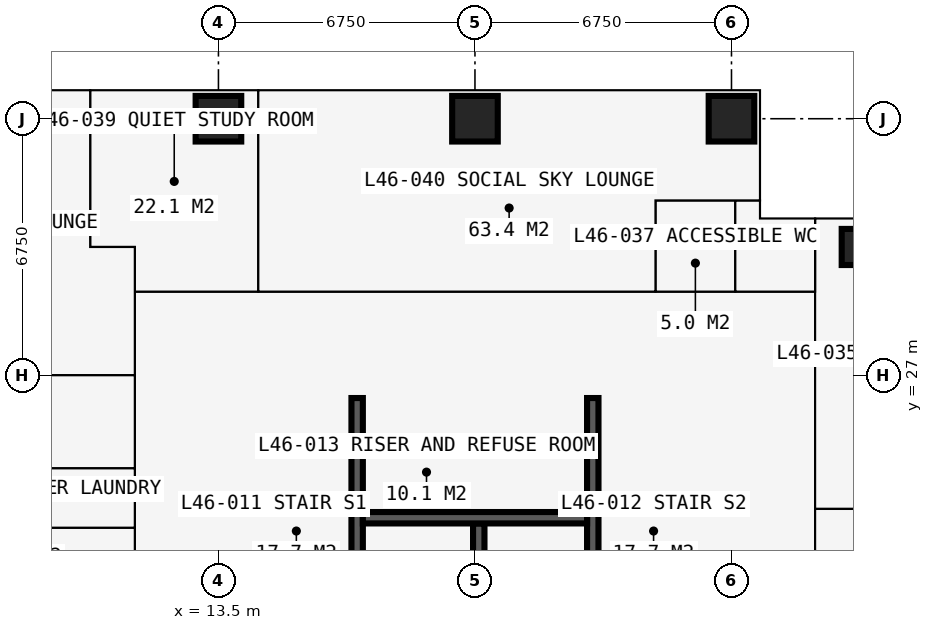
"""IFC4 building model, lengths in metres.
Left out: names, types, materials, properties, quantities, classifications, styles, units other than length and angle.
Written with IfcOpenShell. Run it as: python <this file> out.ifc"""

import sys

from ifc_helpers import new_model, si_unit, direction, frame, frame_2d, origin, origin_2d, place, context, subcontext, project, spatial, rectangle, extrude, element, fill, save


model = new_model("IFC4")
c1 = context("Model", 3, precision=1e-05, world=origin(), true_north=direction((0.0, 1.0)))
c2 = subcontext(c1, "Body", "Model", "MODEL_VIEW")
j1 = project(units=[si_unit("LENGTHUNIT", "METRE"), si_unit("PLANEANGLEUNIT", "RADIAN")], contexts=[c1])
p1 = place(None, origin())
s1 = spatial("IfcSite", under=j1, at=p1, CompositionType="ELEMENT")
p2 = place(p1, origin())
s2 = spatial("IfcBuilding", under=s1, at=p2, CompositionType="ELEMENT")
p3 = place(p2, frame((0.0, 0.0, 171.0)))
s3 = spatial("IfcBuildingStorey", under=s2, at=p3, CompositionType="ELEMENT", Elevation=171.0)
for number, where, z_axis, x_axis in (
    (1, (13.5, 33.75, 0.0), (0.0, 0.0, 1.0), (1.0, 0.0, 0.0)),
    (2, (20.25, 33.75, 0.0), (0.0, 0.0, 1.0), (1.0, 0.0, 0.0)),
    (3, (27.0, 33.75, 0.0), (0.0, 0.0, 1.0), (1.0, 0.0, 0.0)),
):
    element("IfcColumn", number, at=place(p3, frame(where, z_axis=z_axis, x_axis=x_axis)), inside=s3, PredefinedType="COLUMN", context=c2, shape_type="SweptSolid", body=[
        extrude(rectangle(XDim=1.2, YDim=1.2, at=origin_2d()), origin(), (0.0, 0.0, 1.0), 3.6),
    ])
p4 = place(p3, frame((30.375, 30.375, 0.0), z_axis=(0.0, 0.0, 1.0), x_axis=(1.0, 0.0, 0.0)))
e4 = element("IfcColumn", 4, at=p4, inside=s3, PredefinedType="COLUMN", context=c2, shape_type="SweptSolid", body=[
    extrude(rectangle(XDim=0.95, YDim=0.95, at=origin_2d()), origin(), (0.0, 0.0, 1.0), 3.6),
])
p5 = place(p3, frame((26.9, 14.1, 0.0), z_axis=(0.0, 0.0, 1.0), x_axis=(0.0, 1.0, 0.0)))
e5 = element("IfcWall", 5, at=p5, inside=s3, PredefinedType="SHEAR", context=c2, shape_type="SweptSolid", body=[
    extrude(rectangle(XDim=12.3, YDim=1.0, at=frame_2d((6.15, 0.0))), origin(), (0.0, 0.0, 1.0), 3.6),
])
p6 = place(p5, frame((3.65, 0.0, 0.0)))
e6 = element("IfcOpeningElement", 6, at=p6, cuts=e5, PredefinedType="OPENING", context=c2, shape_type="SweptSolid", body=[
    extrude(rectangle(XDim=1.2, YDim=2.2, at=frame_2d((0.6, 1.1))), frame((0.0, 0.51, 0.0), z_axis=(0.0, -1.0, 0.0), x_axis=(1.0, 0.0, 0.0)), (0.0, 0.0, 1.0), 1.02),
])
p7 = place(p3, frame((27.4, 27.0, 0.0), z_axis=(0.0, 0.0, 1.0), x_axis=(-1.0, 0.0, 0.0)))
e7 = element("IfcWall", 7, at=p7, inside=s3, PredefinedType="SHEAR", context=c2, shape_type="SweptSolid", body=[
    extrude(rectangle(XDim=14.3, YDim=1.2, at=frame_2d((7.15, 0.0))), origin(), (0.0, 0.0, 1.0), 3.6),
])
p8 = place(p7, frame((4.55, 0.0, 0.0)))
e8 = element("IfcOpeningElement", 8, at=p8, cuts=e7, PredefinedType="OPENING", context=c2, shape_type="SweptSolid", body=[
    extrude(rectangle(XDim=0.9, YDim=2.2, at=frame_2d((0.45, 1.1))), frame((0.0, 0.61, 0.0), z_axis=(0.0, -1.0, 0.0), x_axis=(1.0, 0.0, 0.0)), (0.0, 0.0, 1.0), 1.22),
])
p9 = place(p7, frame((7.525, 0.0, 0.0)))
e9 = element("IfcOpeningElement", 9, at=p9, cuts=e7, PredefinedType="OPENING", context=c2, shape_type="SweptSolid", body=[
    extrude(rectangle(XDim=1.0, YDim=2.2, at=frame_2d((0.5, 1.1))), frame((0.0, 0.61, 0.0), z_axis=(0.0, -1.0, 0.0), x_axis=(1.0, 0.0, 0.0)), (0.0, 0.0, 1.0), 1.22),
])
p10 = place(p3, frame((13.6, 26.4, 0.0), z_axis=(0.0, 0.0, 1.0), x_axis=(0.0, -1.0, 0.0)))
e10 = element("IfcWall", 10, at=p10, inside=s3, PredefinedType="SHEAR", context=c2, shape_type="SweptSolid", body=[
    extrude(rectangle(XDim=12.3, YDim=1.0, at=frame_2d((6.15, 0.0))), origin(), (0.0, 0.0, 1.0), 3.6),
])
p11 = place(p10, frame((7.45, 0.0, 0.0)))
e11 = element("IfcOpeningElement", 11, at=p11, cuts=e10, PredefinedType="OPENING", context=c2, shape_type="SweptSolid", body=[
    extrude(rectangle(XDim=1.2, YDim=2.2, at=frame_2d((0.6, 1.1))), frame((0.0, 0.51, 0.0), z_axis=(0.0, -1.0, 0.0), x_axis=(1.0, 0.0, 0.0)), (0.0, 0.0, 1.0), 1.02),
])
p12 = place(p3, frame((31.125, 31.125, 0.0), z_axis=(0.0, 0.0, 1.0), x_axis=(-1.0, 0.0, 0.0)))
e12 = element("IfcWall", 12, at=p12, inside=s3, PredefinedType="SOLIDWALL", context=c2, shape_type="SweptSolid", body=[
    extrude(rectangle(XDim=3.375, YDim=0.3, at=frame_2d((1.688, 0.0))), origin(), (0.0, 0.0, 1.0), 3.375),
])
p13 = place(p12, frame((0.212, 0.0, 0.9)))
e13 = element("IfcOpeningElement", 13, at=p13, cuts=e12, PredefinedType="OPENING", context=c2, shape_type="SweptSolid", body=[
    extrude(rectangle(XDim=1.5, YDim=1.8, at=frame_2d((0.75, 0.9))), frame((0.0, 0.16, 0.0), z_axis=(0.0, -1.0, 0.0), x_axis=(1.0, 0.0, 0.0)), (0.0, 0.0, 1.0), 0.32),
])
p14 = place(p3, frame((27.75, 31.125, 0.0), z_axis=(0.0, 0.0, 1.0), x_axis=(0.0, 1.0, 0.0)))
e14 = element("IfcWall", 14, at=p14, inside=s3, PredefinedType="SOLIDWALL", context=c2, shape_type="SweptSolid", body=[
    extrude(rectangle(XDim=3.375, YDim=0.3, at=frame_2d((1.688, 0.0))), origin(), (0.0, 0.0, 1.0), 3.375),
])
p15 = place(p14, frame((0.788, 0.0, 0.6)))
e15 = element("IfcOpeningElement", 15, at=p15, cuts=e14, PredefinedType="OPENING", context=c2, shape_type="SweptSolid", body=[
    extrude(rectangle(XDim=1.8, YDim=2.1, at=frame_2d((0.9, 1.05))), frame((0.0, 0.16, 0.0), z_axis=(0.0, -1.0, 0.0), x_axis=(1.0, 0.0, 0.0)), (0.0, 0.0, 1.0), 0.32),
])
p16 = place(p3, frame((13.5, 34.5, 0.0), z_axis=(0.0, 0.0, 1.0), x_axis=(1.0, 0.0, 0.0)))
e16 = element("IfcWall", 16, at=p16, inside=s3, PredefinedType="SOLIDWALL", context=c2, shape_type="SweptSolid", body=[
    extrude(rectangle(XDim=6.75, YDim=0.15, at=frame_2d((3.375, 0.0))), origin(), (0.0, 0.0, 1.0), 3.375),
])
p17 = place(p16, frame((0.363, 0.0, 0.0)))
e17 = element("IfcOpeningElement", 17, at=p17, cuts=e16, PredefinedType="OPENING", context=c2, shape_type="SweptSolid", body=[
    extrude(rectangle(XDim=1.0, YDim=2.2, at=frame_2d((0.5, 1.1))), frame((0.0, 0.085, 0.0), z_axis=(0.0, -1.0, 0.0), x_axis=(1.0, 0.0, 0.0)), (0.0, 0.0, 1.0), 0.17),
])
p18 = place(p16, frame((1.725, 0.0, 0.9)))
e18 = element("IfcOpeningElement", 18, at=p18, cuts=e16, PredefinedType="OPENING", context=c2, shape_type="SweptSolid", body=[
    extrude(rectangle(XDim=1.2, YDim=1.8, at=frame_2d((0.6, 0.9))), frame((0.0, 0.085, 0.0), z_axis=(0.0, -1.0, 0.0), x_axis=(1.0, 0.0, 0.0)), (0.0, 0.0, 1.0), 0.17),
])
p19 = place(p16, frame((5.137, 0.0, 0.0)))
e19 = element("IfcOpeningElement", 19, at=p19, cuts=e16, PredefinedType="OPENING", context=c2, shape_type="SweptSolid", body=[
    extrude(rectangle(XDim=1.0, YDim=2.2, at=frame_2d((0.5, 1.1))), frame((0.0, 0.085, 0.0), z_axis=(0.0, -1.0, 0.0), x_axis=(1.0, 0.0, 0.0)), (0.0, 0.0, 1.0), 0.17),
])
p20 = place(p16, frame((3.825, 0.0, 0.9)))
e20 = element("IfcOpeningElement", 20, at=p20, cuts=e16, PredefinedType="OPENING", context=c2, shape_type="SweptSolid", body=[
    extrude(rectangle(XDim=1.2, YDim=1.8, at=frame_2d((0.6, 0.9))), frame((0.0, 0.085, 0.0), z_axis=(0.0, -1.0, 0.0), x_axis=(1.0, 0.0, 0.0)), (0.0, 0.0, 1.0), 0.17),
])
p21 = place(p3, frame((16.875, 34.6, 0.0), z_axis=(0.0, 0.0, 1.0), x_axis=(0.0, 1.0, 0.0)))
e21 = element("IfcWall", 21, at=p21, inside=s3, PredefinedType="USERDEFINED", context=c2, shape_type="SweptSolid", body=[
    extrude(rectangle(XDim=2.2, YDim=1.0, at=frame_2d((1.1, 0.0))), origin(), (0.0, 0.0, 1.0), 0.9),
])
for number, where, z_axis, x_axis in (
    (22, (17.15, 20.3, 0.0), (0.0, 0.0, 1.0), (0.0, 1.0, 0.0)),
    (23, (23.35, 20.3, 0.0), (0.0, 0.0, 1.0), (0.0, 1.0, 0.0)),
):
    element("IfcWall", number, at=place(p3, frame(where, z_axis=z_axis, x_axis=x_axis)), inside=s3, PredefinedType="SHEAR", context=c2, shape_type="SweptSolid", body=[
        extrude(rectangle(XDim=6.1, YDim=0.3, at=frame_2d((3.05, 0.0))), origin(), (0.0, 0.0, 1.0), 3.6),
    ])
p22 = place(p3, frame((20.35, 20.3, 0.0), z_axis=(0.0, 0.0, 1.0), x_axis=(0.0, 1.0, 0.0)))
e24 = element("IfcWall", 24, at=p22, inside=s3, PredefinedType="SHEAR", context=c2, shape_type="SweptSolid", body=[
    extrude(rectangle(XDim=2.8, YDim=0.3, at=frame_2d((1.4, 0.0))), origin(), (0.0, 0.0, 1.0), 3.6),
])
p23 = place(p3, frame((17.3, 23.25, 0.0), z_axis=(0.0, 0.0, 1.0), x_axis=(1.0, 0.0, 0.0)))
e25 = element("IfcWall", 25, at=p23, inside=s3, PredefinedType="SHEAR", context=c2, shape_type="SweptSolid", body=[
    extrude(rectangle(XDim=5.9, YDim=0.3, at=frame_2d((2.95, 0.0))), origin(), (0.0, 0.0, 1.0), 3.6),
])
p24 = place(p3, frame((20.725, 23.4, 0.0), z_axis=(0.0, 0.0, 1.0), x_axis=(0.0, 1.0, 0.0)))
e26 = element("IfcWall", 26, at=p24, inside=s3, PredefinedType="PARTITIONING", context=c2, shape_type="SweptSolid", body=[
    extrude(rectangle(XDim=3.0, YDim=0.15, at=frame_2d((1.5, 0.0))), origin(), (0.0, 0.0, 1.0), 3.375),
])
p25 = place(p3, frame((-0.734, 27.0, 0.0), z_axis=(0.0, 0.0, 1.0), x_axis=(1.0, 0.0, 0.0)))
e27 = element("IfcWall", 27, at=p25, inside=s3, PredefinedType="PARTITIONING", context=c2, shape_type="SweptSolid", body=[
    extrude(rectangle(XDim=12.034, YDim=0.15, at=frame_2d((6.017, 0.0))), origin(), (0.0, 0.0, 1.0), 2.806),
])
p26 = place(p25, frame((8.084, 0.0, 0.0)))
e28 = element("IfcOpeningElement", 28, at=p26, cuts=e27, PredefinedType="OPENING", context=c2, shape_type="SweptSolid", body=[
    extrude(rectangle(XDim=1.0, YDim=2.2, at=frame_2d((0.5, 1.1))), frame((0.0, 0.085, 0.0), z_axis=(0.0, -1.0, 0.0), x_axis=(1.0, 0.0, 0.0)), (0.0, 0.0, 1.0), 0.17),
])
p27 = place(p3, frame((5.65, 22.988, 0.0), z_axis=(0.0, 0.0, 1.0), x_axis=(1.0, 0.0, 0.0)))
e29 = element("IfcWall", 29, at=p27, inside=s3, PredefinedType="PARTITIONING", context=c2, shape_type="SweptSolid", body=[
    extrude(rectangle(XDim=5.65, YDim=0.15, at=frame_2d((2.825, 0.0))), origin(), (0.0, 0.0, 1.0), 3.375),
])
p28 = place(p27, frame((2.35, 0.0, 0.0)))
e30 = element("IfcOpeningElement", 30, at=p28, cuts=e29, PredefinedType="OPENING", context=c2, shape_type="SweptSolid", body=[
    extrude(rectangle(XDim=0.95, YDim=2.2, at=frame_2d((0.475, 1.1))), frame((0.0, 0.085, 0.0), z_axis=(0.0, -1.0, 0.0), x_axis=(1.0, 0.0, 0.0)), (0.0, 0.0, 1.0), 0.17),
])
p29 = place(p3, frame((5.65, 24.55, 0.0), z_axis=(0.0, 0.0, 1.0), x_axis=(1.0, 0.0, 0.0)))
e31 = element("IfcWall", 31, at=p29, inside=s3, PredefinedType="PARTITIONING", context=c2, shape_type="SweptSolid", body=[
    extrude(rectangle(XDim=5.65, YDim=0.15, at=frame_2d((2.825, 0.0))), origin(), (0.0, 0.0, 1.0), 3.375),
])
p30 = place(p3, frame((10.125, 30.375, 0.0), z_axis=(0.0, 0.0, 1.0), x_axis=(0.0, 1.0, 0.0)))
e32 = element("IfcWall", 32, at=p30, inside=s3, PredefinedType="PARTITIONING", context=c2, shape_type="SweptSolid", body=[
    extrude(rectangle(XDim=4.109, YDim=0.15, at=frame_2d((2.054, 0.0))), origin(), (0.0, 0.0, 1.0), 3.375),
])
p31 = place(p3, frame((10.125, 30.375, 0.0), z_axis=(0.0, 0.0, 1.0), x_axis=(1.0, 0.0, 0.0)))
e33 = element("IfcWall", 33, at=p31, inside=s3, PredefinedType="PARTITIONING", context=c2, shape_type="SweptSolid", body=[
    extrude(rectangle(XDim=1.175, YDim=0.15, at=frame_2d((0.587, 0.0))), origin(), (0.0, 0.0, 1.0), 3.375),
])
p32 = place(p3, frame((11.3, 11.3, 0.0), z_axis=(0.0, 0.0, 1.0), x_axis=(0.0, 1.0, 0.0)))
e34 = element("IfcWall", 34, at=p32, inside=s3, PredefinedType="PARTITIONING", context=c2, shape_type="SweptSolid", body=[
    extrude(rectangle(XDim=19.075, YDim=0.15, at=frame_2d((9.538, 0.0))), origin(), (0.0, 0.0, 1.0), 3.375),
])
p33 = place(p32, frame((13.95, 0.0, 0.0)))
e35 = element("IfcOpeningElement", 35, at=p33, cuts=e34, PredefinedType="OPENING", context=c2, shape_type="SweptSolid", body=[
    extrude(rectangle(XDim=1.0, YDim=2.2, at=frame_2d((0.5, 1.1))), frame((0.0, 0.085, 0.0), z_axis=(0.0, -1.0, 0.0), x_axis=(1.0, 0.0, 0.0)), (0.0, 0.0, 1.0), 0.17),
])
p34 = place(p3, frame((11.3, 29.2, 0.0), z_axis=(0.0, 0.0, 1.0), x_axis=(1.0, 0.0, 0.0)))
e36 = element("IfcWall", 36, at=p34, inside=s3, PredefinedType="PARTITIONING", context=c2, shape_type="SweptSolid", body=[
    extrude(rectangle(XDim=17.9, YDim=0.2, at=frame_2d((8.95, 0.0))), origin(), (0.0, 0.0, 1.0), 3.375),
])
p35 = place(p34, frame((14.25, 0.0, 0.0)))
e37 = element("IfcOpeningElement", 37, at=p35, cuts=e36, PredefinedType="OPENING", context=c2, shape_type="SweptSolid", body=[
    extrude(rectangle(XDim=1.0, YDim=2.2, at=frame_2d((0.5, 1.1))), frame((0.0, 0.11, 0.0), z_axis=(0.0, -1.0, 0.0), x_axis=(1.0, 0.0, 0.0)), (0.0, 0.0, 1.0), 0.22),
])
p36 = place(p34, frame((16.35, 0.0, 0.0)))
e38 = element("IfcOpeningElement", 38, at=p36, cuts=e36, PredefinedType="OPENING", context=c2, shape_type="SweptSolid", body=[
    extrude(rectangle(XDim=1.0, YDim=2.2, at=frame_2d((0.5, 1.1))), frame((0.0, 0.11, 0.0), z_axis=(0.0, -1.0, 0.0), x_axis=(1.0, 0.0, 0.0)), (0.0, 0.0, 1.0), 0.22),
])
p37 = place(p34, frame((7.749, 0.0, 0.0)))
e39 = element("IfcOpeningElement", 39, at=p37, cuts=e36, PredefinedType="OPENING", context=c2, shape_type="SweptSolid", body=[
    extrude(rectangle(XDim=1.5, YDim=2.2, at=frame_2d((0.75, 1.1))), frame((0.0, 0.11, 0.0), z_axis=(0.0, -1.0, 0.0), x_axis=(1.0, 0.0, 0.0)), (0.0, 0.0, 1.0), 0.22),
])
p38 = place(p3, frame((14.549, 29.2, 0.0), z_axis=(0.0, 0.0, 1.0), x_axis=(0.0, 1.0, 0.0)))
e40 = element("IfcWall", 40, at=p38, inside=s3, PredefinedType="PARTITIONING", context=c2, shape_type="SweptSolid", body=[
    extrude(rectangle(XDim=5.225, YDim=0.15, at=frame_2d((2.613, 0.0))), origin(), (0.0, 0.0, 1.0), 3.375),
])
p39 = place(p38, frame((1.85, 0.0, 0.0)))
e41 = element("IfcOpeningElement", 41, at=p39, cuts=e40, PredefinedType="OPENING", context=c2, shape_type="SweptSolid", body=[
    extrude(rectangle(XDim=1.6, YDim=2.4, at=frame_2d((0.8, 1.2))), frame((0.0, 0.085, 0.0), z_axis=(0.0, -1.0, 0.0), x_axis=(1.0, 0.0, 0.0)), (0.0, 0.0, 1.0), 0.17),
])
p40 = place(p3, frame((25.0, 29.2, 0.0), z_axis=(0.0, 0.0, 1.0), x_axis=(0.0, 1.0, 0.0)))
e42 = element("IfcWall", 42, at=p40, inside=s3, PredefinedType="PARTITIONING", context=c2, shape_type="SweptSolid", body=[
    extrude(rectangle(XDim=2.4, YDim=0.1, at=frame_2d((1.2, 0.0))), origin(), (0.0, 0.0, 1.0), 3.375),
])
p41 = place(p3, frame((25.0, 31.6, 0.0), z_axis=(0.0, 0.0, 1.0), x_axis=(1.0, 0.0, 0.0)))
e43 = element("IfcWall", 43, at=p41, inside=s3, PredefinedType="PARTITIONING", context=c2, shape_type="SweptSolid", body=[
    extrude(rectangle(XDim=2.734, YDim=0.1, at=frame_2d((1.367, 0.0))), origin(), (0.0, 0.0, 1.0), 3.375),
])
p42 = place(p3, frame((27.1, 29.2, 0.0), z_axis=(0.0, 0.0, 1.0), x_axis=(0.0, 1.0, 0.0)))
e44 = element("IfcWall", 44, at=p42, inside=s3, PredefinedType="PARTITIONING", context=c2, shape_type="SweptSolid", body=[
    extrude(rectangle(XDim=2.4, YDim=0.1, at=frame_2d((1.2, 0.0))), origin(), (0.0, 0.0, 1.0), 2.806),
])
p43 = place(p3, frame((29.2, 11.3, 0.0), z_axis=(0.0, 0.0, 1.0), x_axis=(0.0, 1.0, 0.0)))
e45 = element("IfcWall", 45, at=p43, inside=s3, PredefinedType="PARTITIONING", context=c2, shape_type="SweptSolid", body=[
    extrude(rectangle(XDim=19.809, YDim=0.15, at=frame_2d((9.904, 0.0))), origin(), (0.0, 0.0, 1.0), 3.375),
])
p44 = place(p43, frame((0.55, 0.0, 0.0)))
e46 = element("IfcOpeningElement", 46, at=p44, cuts=e45, PredefinedType="OPENING", context=c2, shape_type="SweptSolid", body=[
    extrude(rectangle(XDim=1.0, YDim=2.2, at=frame_2d((0.5, 1.1))), frame((0.0, 0.085, 0.0), z_axis=(0.0, -1.0, 0.0), x_axis=(1.0, 0.0, 0.0)), (0.0, 0.0, 1.0), 0.17),
])
p45 = place(p43, frame((2.65, 0.0, 0.0)))
e47 = element("IfcOpeningElement", 47, at=p45, cuts=e45, PredefinedType="OPENING", context=c2, shape_type="SweptSolid", body=[
    extrude(rectangle(XDim=1.0, YDim=2.2, at=frame_2d((0.5, 1.1))), frame((0.0, 0.085, 0.0), z_axis=(0.0, -1.0, 0.0), x_axis=(1.0, 0.0, 0.0)), (0.0, 0.0, 1.0), 0.17),
])
p46 = place(p43, frame((7.45, 0.0, 0.0)))
e48 = element("IfcOpeningElement", 48, at=p46, cuts=e45, PredefinedType="OPENING", context=c2, shape_type="SweptSolid", body=[
    extrude(rectangle(XDim=1.5, YDim=2.2, at=frame_2d((0.75, 1.1))), frame((0.0, 0.085, 0.0), z_axis=(0.0, -1.0, 0.0), x_axis=(1.0, 0.0, 0.0)), (0.0, 0.0, 1.0), 0.17),
])
p47 = place(p3, frame((29.2, 23.482, 0.0), z_axis=(0.0, 0.0, 1.0), x_axis=(1.0, 0.0, 0.0)))
e49 = element("IfcWall", 49, at=p47, inside=s3, PredefinedType="PARTITIONING", context=c2, shape_type="SweptSolid", body=[
    extrude(rectangle(XDim=5.284, YDim=0.15, at=frame_2d((2.642, 0.0))), origin(), (0.0, 0.0, 1.0), 3.375),
])
p48 = place(p47, frame((1.85, 0.0, 0.0)))
e50 = element("IfcOpeningElement", 50, at=p48, cuts=e49, PredefinedType="OPENING", context=c2, shape_type="SweptSolid", body=[
    extrude(rectangle(XDim=1.6, YDim=2.4, at=frame_2d((0.8, 1.2))), frame((0.0, 0.085, 0.0), z_axis=(0.0, -1.0, 0.0), x_axis=(1.0, 0.0, 0.0)), (0.0, 0.0, 1.0), 0.17),
])
p49 = place(p13, origin())
e51 = element("IfcWindow", 51, at=p49, inside=s3, PartitioningType="SINGLE_PANEL", PredefinedType="WINDOW", context=c2, shape_type="SweptSolid", body=[
    extrude(rectangle(XDim=1.5, YDim=1.8, at=frame_2d((0.75, 0.9))), frame((0.0, 0.03, 0.0), z_axis=(0.0, -1.0, 0.0), x_axis=(1.0, 0.0, 0.0)), (0.0, 0.0, 1.0), 0.06),
])
fill(e13, e51)
p50 = place(p15, origin())
e52 = element("IfcWindow", 52, at=p50, inside=s3, PartitioningType="SINGLE_PANEL", PredefinedType="WINDOW", context=c2, shape_type="SweptSolid", body=[
    extrude(rectangle(XDim=1.8, YDim=2.1, at=frame_2d((0.9, 1.05))), frame((0.0, 0.03, 0.0), z_axis=(0.0, -1.0, 0.0), x_axis=(1.0, 0.0, 0.0)), (0.0, 0.0, 1.0), 0.06),
])
fill(e15, e52)
p51 = place(p17, origin())
e53 = element("IfcDoor", 53, at=p51, inside=s3, OperationType="SINGLE_SWING_LEFT", PredefinedType="DOOR", context=c2, shape_type="SweptSolid", body=[
    extrude(rectangle(XDim=1.0, YDim=2.2, at=frame_2d((0.5, 1.1))), frame((0.0, 0.025, 0.0), z_axis=(0.0, -1.0, 0.0), x_axis=(1.0, 0.0, 0.0)), (0.0, 0.0, 1.0), 0.05),
])
fill(e17, e53)
p52 = place(p18, origin())
e54 = element("IfcWindow", 54, at=p52, inside=s3, PartitioningType="SINGLE_PANEL", PredefinedType="WINDOW", context=c2, shape_type="SweptSolid", body=[
    extrude(rectangle(XDim=1.2, YDim=1.8, at=frame_2d((0.6, 0.9))), frame((0.0, 0.03, 0.0), z_axis=(0.0, -1.0, 0.0), x_axis=(1.0, 0.0, 0.0)), (0.0, 0.0, 1.0), 0.06),
])
fill(e18, e54)
p53 = place(p19, origin())
e55 = element("IfcDoor", 55, at=p53, inside=s3, OperationType="SINGLE_SWING_RIGHT", PredefinedType="DOOR", context=c2, shape_type="SweptSolid", body=[
    extrude(rectangle(XDim=1.0, YDim=2.2, at=frame_2d((0.5, 1.1))), frame((0.0, 0.025, 0.0), z_axis=(0.0, -1.0, 0.0), x_axis=(1.0, 0.0, 0.0)), (0.0, 0.0, 1.0), 0.05),
])
fill(e19, e55)
p54 = place(p20, origin())
e56 = element("IfcWindow", 56, at=p54, inside=s3, PartitioningType="SINGLE_PANEL", PredefinedType="WINDOW", context=c2, shape_type="SweptSolid", body=[
    extrude(rectangle(XDim=1.2, YDim=1.8, at=frame_2d((0.6, 0.9))), frame((0.0, 0.03, 0.0), z_axis=(0.0, -1.0, 0.0), x_axis=(1.0, 0.0, 0.0)), (0.0, 0.0, 1.0), 0.06),
])
fill(e20, e56)
p55 = place(p8, origin())
e57 = element("IfcDoor", 57, at=p55, inside=s3, OperationType="SINGLE_SWING_LEFT", PredefinedType="DOOR", context=c2, shape_type="SweptSolid", body=[
    extrude(rectangle(XDim=0.9, YDim=2.2, at=frame_2d((0.45, 1.1))), frame((0.0, 0.4, 0.0), z_axis=(0.0, -1.0, 0.0), x_axis=(1.0, 0.0, 0.0)), (0.0, 0.0, 1.0), 0.8),
])
fill(e8, e57)
p56 = place(p9, origin())
e58 = element("IfcDoor", 58, at=p56, inside=s3, OperationType="SINGLE_SWING_LEFT", PredefinedType="DOOR", context=c2, shape_type="SweptSolid", body=[
    extrude(rectangle(XDim=1.0, YDim=2.2, at=frame_2d((0.5, 1.1))), frame((0.0, 0.025, 0.0), z_axis=(0.0, -1.0, 0.0), x_axis=(1.0, 0.0, 0.0)), (0.0, 0.0, 1.0), 0.05),
])
fill(e9, e58)
p57 = place(p35, origin())
e59 = element("IfcDoor", 59, at=p57, inside=s3, OperationType="SINGLE_SWING_LEFT", PredefinedType="DOOR", context=c2, shape_type="SweptSolid", body=[
    extrude(rectangle(XDim=1.0, YDim=2.2, at=frame_2d((0.5, 1.1))), frame((0.0, 0.025, 0.0), z_axis=(0.0, -1.0, 0.0), x_axis=(1.0, 0.0, 0.0)), (0.0, 0.0, 1.0), 0.05),
])
fill(e37, e59)
p58 = place(p36, origin())
e60 = element("IfcDoor", 60, at=p58, inside=s3, OperationType="SINGLE_SWING_LEFT", PredefinedType="DOOR", context=c2, shape_type="SweptSolid", body=[
    extrude(rectangle(XDim=1.0, YDim=2.2, at=frame_2d((0.5, 1.1))), frame((0.0, 0.025, 0.0), z_axis=(0.0, -1.0, 0.0), x_axis=(1.0, 0.0, 0.0)), (0.0, 0.0, 1.0), 0.05),
])
fill(e38, e60)
p59 = place(p39, origin())
e61 = element("IfcDoor", 61, at=p59, inside=s3, OperationType="DOUBLE_DOOR_SINGLE_SWING", PredefinedType="DOOR", context=c2, shape_type="SweptSolid", body=[
    extrude(rectangle(XDim=1.6, YDim=2.4, at=frame_2d((0.8, 1.2))), frame((0.0, 0.025, 0.0), z_axis=(0.0, -1.0, 0.0), x_axis=(1.0, 0.0, 0.0)), (0.0, 0.0, 1.0), 0.05),
])
fill(e41, e61)
p60 = place(p37, origin())
e62 = element("IfcDoor", 62, at=p60, inside=s3, OperationType="DOUBLE_DOOR_SINGLE_SWING", PredefinedType="DOOR", context=c2, shape_type="SweptSolid", body=[
    extrude(rectangle(XDim=1.5, YDim=2.2, at=frame_2d((0.75, 1.1))), frame((0.0, 0.025, 0.0), z_axis=(0.0, -1.0, 0.0), x_axis=(1.0, 0.0, 0.0)), (0.0, 0.0, 1.0), 0.05),
])
fill(e39, e62)
p61 = place(p33, origin())
e63 = element("IfcDoor", 63, at=p61, inside=s3, OperationType="SINGLE_SWING_LEFT", PredefinedType="DOOR", context=c2, shape_type="SweptSolid", body=[
    extrude(rectangle(XDim=1.0, YDim=2.2, at=frame_2d((0.5, 1.1))), frame((0.0, 0.025, 0.0), z_axis=(0.0, -1.0, 0.0), x_axis=(1.0, 0.0, 0.0)), (0.0, 0.0, 1.0), 0.05),
])
fill(e35, e63)
save(model, sys.argv[1])
